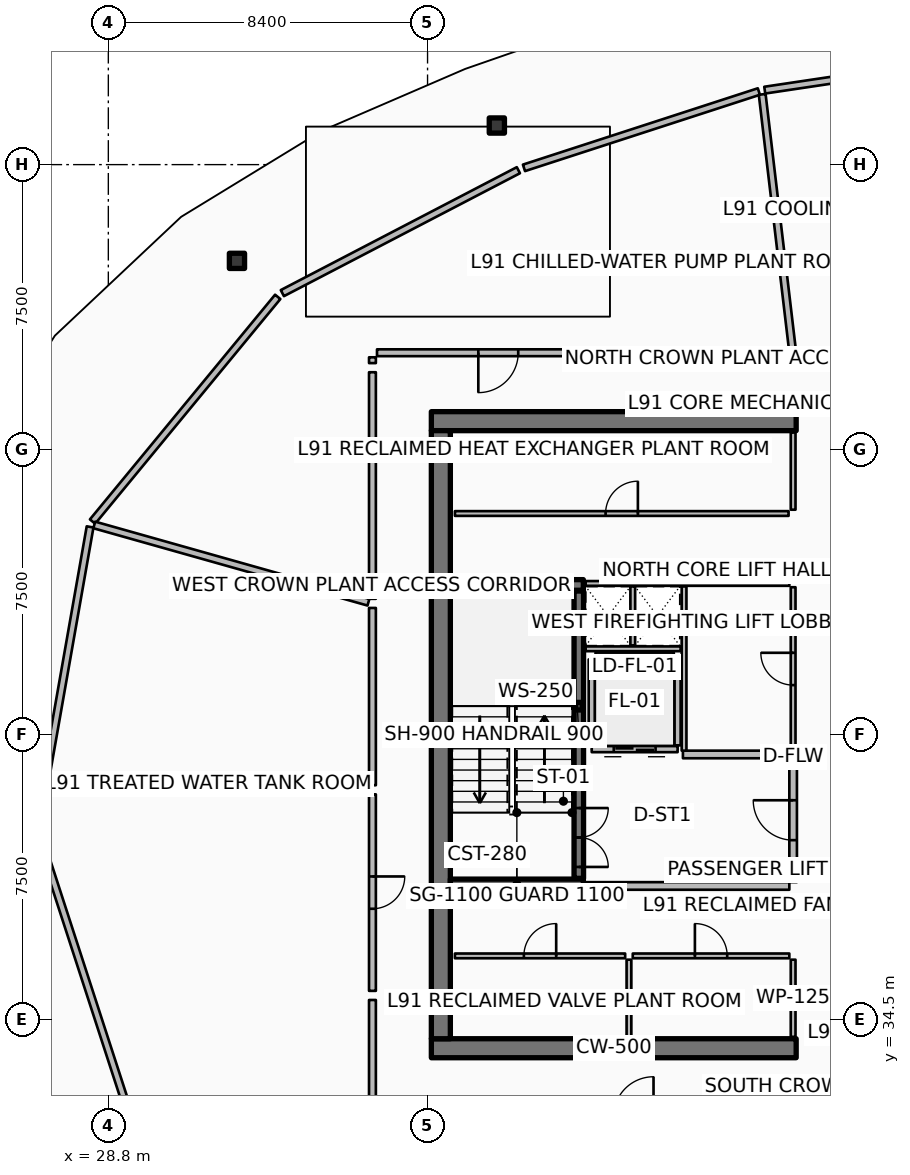
"""IFC4 building model, lengths in metres.
Left out: names, types, materials, properties, quantities, classifications, styles, units other than length and angle.
Written with IfcOpenShell. Run it as: python <this file> out.ifc"""

import sys

from ifc_helpers import new_model, si_unit, direction, frame, frame_2d, origin, origin_2d, place, context, subcontext, project, spatial, rectangle, hollow_rectangle, extrude, element, fill, save


model = new_model("IFC4")
c1 = context("Model", 3, precision=1e-05, world=origin(), true_north=direction((0.0, 1.0)))
c2 = subcontext(c1, "Body", "Model", "MODEL_VIEW")
j1 = project(units=[si_unit("LENGTHUNIT", "METRE"), si_unit("PLANEANGLEUNIT", "RADIAN")], contexts=[c1])
p1 = place(None, origin())
s1 = spatial("IfcSite", under=j1, at=p1, CompositionType="ELEMENT")
p2 = place(p1, origin())
s2 = spatial("IfcBuilding", under=s1, at=p2, CompositionType="ELEMENT")
p3 = place(p2, frame((0.0, 0.0, 363.2)))
s3 = spatial("IfcBuildingStorey", under=s2, at=p3, CompositionType="ELEMENT", Elevation=363.2)
for number, where, z_axis, x_axis in (
    (1, (37.3, 33.75, 0.0), (0.0, 0.0, 1.0), (1.0, 0.0, 0.0)),
    (2, (37.3, 50.25, 0.0), (0.0, 0.0, 1.0), (1.0, 0.0, 0.0)),
):
    element("IfcWall", number, at=place(p3, frame(where, z_axis=z_axis, x_axis=x_axis)), inside=s3, PredefinedType="SHEAR", context=c2, shape_type="SweptSolid", body=[
        extrude(rectangle(XDim=9.6, YDim=0.5, at=frame_2d((4.8, 0.0))), origin(), (0.0, 0.0, 1.0), 3.6),
    ])
p4 = place(p3, frame((37.55, 34.0, 0.0), z_axis=(0.0, 0.0, 1.0), x_axis=(0.0, 1.0, 0.0)))
e3 = element("IfcWall", 3, at=p4, inside=s3, PredefinedType="SHEAR", context=c2, shape_type="SweptSolid", body=[
    extrude(rectangle(XDim=16.0, YDim=0.5, at=frame_2d((8.0, 0.0))), origin(), (0.0, 0.0, 1.0), 3.6),
])
for number, where, z_axis, x_axis in (
    (4, (37.8, 38.06, 0.0), (0.0, 0.0, 1.0), (1.0, 0.0, 0.0)),
    (5, (37.8, 45.94, 0.0), (0.0, 0.0, 1.0), (1.0, 0.0, 0.0)),
):
    element("IfcWall", number, at=place(p3, frame(where, z_axis=z_axis, x_axis=x_axis)), inside=s3, PredefinedType="SHEAR", context=c2, shape_type="SweptSolid", body=[
        extrude(rectangle(XDim=3.5, YDim=0.28, at=frame_2d((1.75, 0.0))), origin(), (0.0, 0.0, 1.0), 3.6),
    ])
p5 = place(p3, frame((41.18, 42.75, 0.0), z_axis=(0.0, 0.0, 1.0), x_axis=(1.0, 0.0, 0.0)))
e6 = element("IfcColumn", 6, at=p5, inside=s3, PredefinedType="COLUMN", context=c2, shape_type="SweptSolid", body=[
    extrude(hollow_rectangle(XDim=0.2, YDim=0.2, WallThickness=0.01, InnerFilletRadius=0.01, OuterFilletRadius=0.02, at=origin_2d()), origin(), (0.0, 0.0, 1.0), 1.595),
])
for number, where, z_axis, x_axis in (
    (7, (39.023, 58.029, 0.0), (0.0, 0.0, 1.0), (1.0, 0.0, 0.0)),
    (8, (32.185, 54.468, 0.0), (0.0, 0.0, 1.0), (1.0, 0.0, 0.0)),
):
    element("IfcColumn", number, at=place(p3, frame(where, z_axis=z_axis, x_axis=x_axis)), inside=s3, PredefinedType="COLUMN", context=c2, shape_type="SweptSolid", body=[
        extrude(hollow_rectangle(XDim=0.4, YDim=0.4, WallThickness=0.02, InnerFilletRadius=0.02, OuterFilletRadius=0.04, at=origin_2d()), origin(), (0.0, 0.0, 1.0), 3.32),
    ])
p6 = place(p3, frame((41.18, 38.22, 0.0), z_axis=(0.0, 0.0, 1.0), x_axis=(0.0, 1.0, 0.0)))
e9 = element("IfcWall", 9, at=p6, inside=s3, PredefinedType="SOLIDWALL", context=c2, shape_type="SweptSolid", body=[
    extrude(rectangle(XDim=7.56, YDim=0.25, at=frame_2d((3.78, 0.0))), origin(), (0.0, 0.0, 1.0), 3.32),
])
p7 = place(p6, frame((0.3, 0.0, 0.0)))
e10 = element("IfcOpeningElement", 10, at=p7, cuts=e9, PredefinedType="OPENING", context=c2, shape_type="SweptSolid", body=[
    extrude(rectangle(XDim=1.55, YDim=2.15, at=frame_2d((0.775, 1.075))), frame((0.0, 0.135, 0.0), z_axis=(0.0, -1.0, 0.0), x_axis=(1.0, 0.0, 0.0)), (0.0, 0.0, 1.0), 0.27),
])
p8 = place(p3, frame((43.78, 41.62, 0.0), z_axis=(0.0, 0.0, 1.0), x_axis=(-1.0, 0.0, 0.0)))
e11 = element("IfcWall", 11, at=p8, inside=s3, PredefinedType="PARTITIONING", context=c2, shape_type="SweptSolid", body=[
    extrude(rectangle(XDim=2.26, YDim=0.16, at=frame_2d((1.13, 0.0))), origin(), (0.0, 0.0, 1.0), 3.32),
])
p9 = place(p8, frame((0.58, 0.0, 0.0)))
e12 = element("IfcOpeningElement", 12, at=p9, cuts=e11, PredefinedType="OPENING", context=c2, shape_type="SweptSolid", body=[
    extrude(rectangle(XDim=1.1, YDim=2.1, at=frame_2d((0.55, 1.05))), frame((0.0, 0.09, 0.0), z_axis=(0.0, -1.0, 0.0), x_axis=(1.0, 0.0, 0.0)), (0.0, 0.0, 1.0), 0.18),
])
for number, where, z_axis, x_axis in (
    (13, (43.78, 41.72, 0.0), (0.0, 0.0, 1.0), (0.0, 1.0, 0.0)),
    (14, (41.52, 41.72, 0.0), (0.0, 0.0, 1.0), (0.0, 1.0, 0.0)),
):
    element("IfcWall", number, at=place(p3, frame(where, z_axis=z_axis, x_axis=x_axis)), inside=s3, PredefinedType="PARTITIONING", context=c2, shape_type="SweptSolid", body=[
        extrude(rectangle(XDim=2.26, YDim=0.16, at=frame_2d((1.13, 0.0))), origin(), (0.0, 0.0, 1.0), 3.32),
    ])
p10 = place(p3, frame((41.62, 44.08, 0.0), z_axis=(0.0, 0.0, 1.0), x_axis=(1.0, 0.0, 0.0)))
e15 = element("IfcWall", 15, at=p10, inside=s3, PredefinedType="PARTITIONING", context=c2, shape_type="SweptSolid", body=[
    extrude(rectangle(XDim=2.06, YDim=0.16, at=frame_2d((1.03, 0.0))), origin(), (0.0, 0.0, 1.0), 3.32),
])
for number, where, z_axis, x_axis in (
    (16, (46.82, 34.05, 0.0), (0.0, 0.0, 1.0), (0.0, 1.0, 0.0)),
    (17, (42.5, 34.05, 0.0), (0.0, 0.0, 1.0), (0.0, 1.0, 0.0)),
):
    element("IfcWall", number, at=place(p3, frame(where, z_axis=z_axis, x_axis=x_axis)), inside=s3, PredefinedType="PARTITIONING", context=c2, shape_type="SweptSolid", body=[
        extrude(rectangle(XDim=2.03, YDim=0.125, at=frame_2d((1.015, 0.0))), origin(), (0.0, 0.0, 1.0), 2.76),
    ])
p11 = place(p3, frame((37.92, 36.18, 0.0), z_axis=(0.0, 0.0, 1.0), x_axis=(1.0, 0.0, 0.0)))
e18 = element("IfcWall", 18, at=p11, inside=s3, PredefinedType="PARTITIONING", context=c2, shape_type="SweptSolid", body=[
    extrude(rectangle(XDim=4.48, YDim=0.125, at=frame_2d((2.24, 0.0))), origin(), (0.0, 0.0, 1.0), 2.76),
])
p12 = place(p11, frame((1.815, 0.0, 0.0)))
e19 = element("IfcOpeningElement", 19, at=p12, cuts=e18, PredefinedType="OPENING", context=c2, shape_type="SweptSolid", body=[
    extrude(rectangle(XDim=0.85, YDim=2.06, at=frame_2d((0.425, 1.03))), frame((0.0, 0.073, 0.0), z_axis=(0.0, -1.0, 0.0), x_axis=(1.0, 0.0, 0.0)), (0.0, 0.0, 1.0), 0.145),
])
p13 = place(p3, frame((42.6, 36.18, 0.0), z_axis=(0.0, 0.0, 1.0), x_axis=(1.0, 0.0, 0.0)))
e20 = element("IfcWall", 20, at=p13, inside=s3, PredefinedType="PARTITIONING", context=c2, shape_type="SweptSolid", body=[
    extrude(rectangle(XDim=4.12, YDim=0.125, at=frame_2d((2.06, 0.0))), origin(), (0.0, 0.0, 1.0), 2.76),
])
p14 = place(p13, frame((1.635, 0.0, 0.0)))
e21 = element("IfcOpeningElement", 21, at=p14, cuts=e20, PredefinedType="OPENING", context=c2, shape_type="SweptSolid", body=[
    extrude(rectangle(XDim=0.85, YDim=2.06, at=frame_2d((0.425, 1.03))), frame((0.0, 0.073, 0.0), z_axis=(0.0, -1.0, 0.0), x_axis=(1.0, 0.0, 0.0)), (0.0, 0.0, 1.0), 0.145),
])
p15 = place(p3, frame((46.82, 47.92, 0.0), z_axis=(0.0, 0.0, 1.0), x_axis=(0.0, 1.0, 0.0)))
e22 = element("IfcWall", 22, at=p15, inside=s3, PredefinedType="PARTITIONING", context=c2, shape_type="SweptSolid", body=[
    extrude(rectangle(XDim=2.03, YDim=0.125, at=frame_2d((1.015, 0.0))), origin(), (0.0, 0.0, 1.0), 2.76),
])
p16 = place(p3, frame((37.92, 47.82, 0.0), z_axis=(0.0, 0.0, 1.0), x_axis=(1.0, 0.0, 0.0)))
e23 = element("IfcWall", 23, at=p16, inside=s3, PredefinedType="PARTITIONING", context=c2, shape_type="SweptSolid", body=[
    extrude(rectangle(XDim=8.78, YDim=0.125, at=frame_2d((4.39, 0.0))), origin(), (0.0, 0.0, 1.0), 2.76),
])
p17 = place(p16, frame((3.965, 0.0, 0.0)))
e24 = element("IfcOpeningElement", 24, at=p17, cuts=e23, PredefinedType="OPENING", context=c2, shape_type="SweptSolid", body=[
    extrude(rectangle(XDim=0.85, YDim=2.06, at=frame_2d((0.425, 1.03))), frame((0.0, 0.073, 0.0), z_axis=(0.0, -1.0, 0.0), x_axis=(1.0, 0.0, 0.0)), (0.0, 0.0, 1.0), 0.145),
])
p18 = place(p3, frame((41.35, 38.02, 0.0), z_axis=(0.0, 0.0, 1.0), x_axis=(1.0, 0.0, 0.0)))
e25 = element("IfcWall", 25, at=p18, inside=s3, PredefinedType="PARTITIONING", context=c2, shape_type="SweptSolid", body=[
    extrude(rectangle(XDim=5.37, YDim=0.2, at=frame_2d((2.685, 0.0))), origin(), (0.0, 0.0, 1.0), 3.32),
])
p19 = place(p3, frame((43.92, 41.48, 0.0), z_axis=(0.0, 0.0, 1.0), x_axis=(1.0, 0.0, 0.0)))
e26 = element("IfcWall", 26, at=p19, inside=s3, PredefinedType="PARTITIONING", context=c2, shape_type="SweptSolid", body=[
    extrude(rectangle(XDim=2.8, YDim=0.2, at=frame_2d((1.4, 0.0))), origin(), (0.0, 0.0, 1.0), 3.32),
])
p20 = place(p3, frame((46.82, 38.12, 0.0), z_axis=(0.0, 0.0, 1.0), x_axis=(0.0, 1.0, 0.0)))
e27 = element("IfcWall", 27, at=p20, inside=s3, PredefinedType="PARTITIONING", context=c2, shape_type="SweptSolid", body=[
    extrude(rectangle(XDim=3.26, YDim=0.2, at=frame_2d((1.63, 0.0))), origin(), (0.0, 0.0, 1.0), 3.32),
])
p21 = place(p20, frame((1.105, 0.0, 0.0)))
e28 = element("IfcOpeningElement", 28, at=p21, cuts=e27, PredefinedType="OPENING", context=c2, shape_type="SweptSolid", body=[
    extrude(rectangle(XDim=1.05, YDim=2.1, at=frame_2d((0.525, 1.05))), frame((0.0, 0.11, 0.0), z_axis=(0.0, -1.0, 0.0), x_axis=(1.0, 0.0, 0.0)), (0.0, 0.0, 1.0), 0.22),
])
p22 = place(p3, frame((41.36, 45.98, 0.0), z_axis=(0.0, 0.0, 1.0), x_axis=(1.0, 0.0, 0.0)))
e29 = element("IfcWall", 29, at=p22, inside=s3, PredefinedType="PARTITIONING", context=c2, shape_type="SweptSolid", body=[
    extrude(rectangle(XDim=5.36, YDim=0.125, at=frame_2d((2.68, 0.0))), origin(), (0.0, 0.0, 1.0), 2.76),
])
p23 = place(p3, frame((41.36, 44.26, 0.0), z_axis=(0.0, 0.0, 1.0), x_axis=(1.0, 0.0, 0.0)))
e30 = element("IfcWall", 30, at=p23, inside=s3, PredefinedType="PARTITIONING", context=c2, shape_type="SweptSolid", body=[
    extrude(rectangle(XDim=2.5, YDim=0.125, at=frame_2d((1.25, 0.0))), origin(), (0.0, 0.0, 1.0), 2.76),
])
p24 = place(p3, frame((42.6, 44.35, 0.0), z_axis=(0.0, 0.0, 1.0), x_axis=(0.0, 1.0, 0.0)))
e31 = element("IfcWall", 31, at=p24, inside=s3, PredefinedType="PARTITIONING", context=c2, shape_type="SweptSolid", body=[
    extrude(rectangle(XDim=1.55, YDim=0.125, at=frame_2d((0.775, 0.0))), origin(), (0.0, 0.0, 1.0), 2.76),
])
p25 = place(p3, frame((43.95, 41.58, 0.0), z_axis=(0.0, 0.0, 1.0), x_axis=(0.0, 1.0, 0.0)))
e32 = element("IfcWall", 32, at=p25, inside=s3, PredefinedType="PARTITIONING", context=c2, shape_type="SweptSolid", body=[
    extrude(rectangle(XDim=4.32, YDim=0.125, at=frame_2d((2.16, 0.0))), origin(), (0.0, 0.0, 1.0), 2.76),
])
p26 = place(p3, frame((46.82, 41.58, 0.0), z_axis=(0.0, 0.0, 1.0), x_axis=(0.0, 1.0, 0.0)))
e33 = element("IfcWall", 33, at=p26, inside=s3, PredefinedType="PARTITIONING", context=c2, shape_type="SweptSolid", body=[
    extrude(rectangle(XDim=4.3, YDim=0.125, at=frame_2d((2.15, 0.0))), origin(), (0.0, 0.0, 1.0), 2.76),
])
p27 = place(p26, frame((1.725, 0.0, 0.0)))
e34 = element("IfcOpeningElement", 34, at=p27, cuts=e33, PredefinedType="OPENING", context=c2, shape_type="SweptSolid", body=[
    extrude(rectangle(XDim=0.85, YDim=2.06, at=frame_2d((0.425, 1.03))), frame((0.0, 0.073, 0.0), z_axis=(0.0, -1.0, 0.0), x_axis=(1.0, 0.0, 0.0)), (0.0, 0.0, 1.0), 0.145),
])
p28 = place(p3, frame((52.999, 59.994, 0.0), z_axis=(0.0, 0.0, 1.0), x_axis=(-0.989034336252, -0.147685753256, 0.0)))
e35 = element("IfcWall", 35, at=p28, inside=s3, PredefinedType="PARTITIONING", context=c2, shape_type="SweptSolid", body=[
    extrude(rectangle(XDim=7.003, YDim=0.18, at=frame_2d((3.501, 0.0))), origin(), (0.0, 0.0, 1.0), 2.76),
])
p29 = place(p3, frame((45.918, 58.923, 0.0), z_axis=(0.0, 0.0, 1.0), x_axis=(-0.95105283999, -0.309028308649, 0.0)))
e36 = element("IfcWall", 36, at=p29, inside=s3, PredefinedType="PARTITIONING", context=c2, shape_type="SweptSolid", body=[
    extrude(rectangle(XDim=6.499, YDim=0.18, at=frame_2d((3.25, 0.0))), origin(), (0.0, 0.0, 1.0), 2.76),
])
p30 = place(p3, frame((39.59, 56.853, 0.0), z_axis=(0.0, 0.0, 1.0), x_axis=(-0.886949494865, -0.461866423935, 0.0)))
e37 = element("IfcWall", 37, at=p30, inside=s3, PredefinedType="PARTITIONING", context=c2, shape_type="SweptSolid", body=[
    extrude(rectangle(XDim=7.002, YDim=0.18, at=frame_2d((3.501, 0.0))), origin(), (0.0, 0.0, 1.0), 2.76),
])
p31 = place(p3, frame((33.258, 53.52, 0.0), z_axis=(0.0, 0.0, 1.0), x_axis=(-0.636018833443, -0.771673534278, 0.0)))
e38 = element("IfcWall", 38, at=p31, inside=s3, PredefinedType="PARTITIONING", context=c2, shape_type="SweptSolid", body=[
    extrude(rectangle(XDim=7.661, YDim=0.18, at=frame_2d((3.831, 0.0))), origin(), (0.0, 0.0, 1.0), 2.76),
])
p32 = place(p3, frame((28.32, 47.468, 0.0), z_axis=(0.0, 0.0, 1.0), x_axis=(-0.173668776466, -0.984804120666, 0.0)))
e39 = element("IfcWall", 39, at=p32, inside=s3, PredefinedType="PARTITIONING", context=c2, shape_type="SweptSolid", body=[
    extrude(rectangle(XDim=8.006, YDim=0.18, at=frame_2d((4.003, 0.0))), origin(), (0.0, 0.0, 1.0), 2.76),
])
p33 = place(p3, frame((26.941, 39.428, 0.0), z_axis=(0.0, 0.0, 1.0), x_axis=(0.309024234991, -0.951054163646, 0.0)))
e40 = element("IfcWall", 40, at=p33, inside=s3, PredefinedType="PARTITIONING", context=c2, shape_type="SweptSolid", body=[
    extrude(rectangle(XDim=8.124, YDim=0.18, at=frame_2d((4.062, 0.0))), origin(), (0.0, 0.0, 1.0), 2.76),
])
p34 = place(p3, frame((50.714, 52.05, 0.0), z_axis=(0.0, 0.0, 1.0), x_axis=(-1.0, 0.0, 0.0)))
e41 = element("IfcWall", 41, at=p34, inside=s3, PredefinedType="PARTITIONING", context=c2, shape_type="SweptSolid", body=[
    extrude(rectangle(XDim=3.784, YDim=0.18, at=frame_2d((1.892, 0.0))), origin(), (0.0, 0.0, 1.0), 2.76),
])
p35 = place(p3, frame((46.798, 52.159, 0.0), z_axis=(0.0, 0.0, 1.0), x_axis=(-0.117541495417, 0.993067971921, 0.0)))
e42 = element("IfcWall", 42, at=p35, inside=s3, PredefinedType="PARTITIONING", context=c2, shape_type="SweptSolid", body=[
    extrude(rectangle(XDim=6.736, YDim=0.18, at=frame_2d((3.368, 0.0))), origin(), (0.0, 0.0, 1.0), 2.76),
])
p36 = place(p3, frame((46.69, 52.05, 0.0), z_axis=(0.0, 0.0, 1.0), x_axis=(-1.0, 0.0, 0.0)))
e43 = element("IfcWall", 43, at=p36, inside=s3, PredefinedType="PARTITIONING", context=c2, shape_type="SweptSolid", body=[
    extrude(rectangle(XDim=4.199, YDim=0.18, at=frame_2d((2.099, 0.0))), origin(), (0.0, 0.0, 1.0), 2.76),
])
p37 = place(p3, frame((42.252, 52.05, 0.0), z_axis=(0.0, 0.0, 1.0), x_axis=(-1.0, 0.0, 0.0)))
e44 = element("IfcWall", 44, at=p37, inside=s3, PredefinedType="PARTITIONING", context=c2, shape_type="SweptSolid", body=[
    extrude(rectangle(XDim=6.382, YDim=0.18, at=frame_2d((3.191, 0.0))), origin(), (0.0, 0.0, 1.0), 2.76),
])
p38 = place(p37, frame((2.666, 0.0, 0.0)))
e45 = element("IfcOpeningElement", 45, at=p38, cuts=e44, PredefinedType="OPENING", context=c2, shape_type="SweptSolid", body=[
    extrude(rectangle(XDim=1.05, YDim=2.1, at=frame_2d((0.525, 1.05))), frame((0.0, 0.1, 0.0), z_axis=(0.0, -1.0, 0.0), x_axis=(1.0, 0.0, 0.0)), (0.0, 0.0, 1.0), 0.2),
])
p39 = place(p3, frame((35.75, 51.93, 0.0), z_axis=(0.0, 0.0, 1.0), x_axis=(0.0, -1.0, 0.0)))
e46 = element("IfcWall", 46, at=p39, inside=s3, PredefinedType="PARTITIONING", context=c2, shape_type="SweptSolid", body=[
    extrude(rectangle(XDim=0.153, YDim=0.18, at=frame_2d((0.076, 0.0))), origin(), (0.0, 0.0, 1.0), 2.76),
])
p40 = place(p3, frame((35.75, 51.537, 0.0), z_axis=(0.0, 0.0, 1.0), x_axis=(0.0, -1.0, 0.0)))
e47 = element("IfcWall", 47, at=p40, inside=s3, PredefinedType="PARTITIONING", context=c2, shape_type="SweptSolid", body=[
    extrude(rectangle(XDim=5.962, YDim=0.18, at=frame_2d((2.981, 0.0))), origin(), (0.0, 0.0, 1.0), 2.76),
])
p41 = place(p3, frame((35.644, 45.485, 0.0), z_axis=(0.0, 0.0, 1.0), x_axis=(-0.96245862205, 0.271428445159, 0.0)))
e48 = element("IfcWall", 48, at=p41, inside=s3, PredefinedType="PARTITIONING", context=c2, shape_type="SweptSolid", body=[
    extrude(rectangle(XDim=7.495, YDim=0.18, at=frame_2d((3.748, 0.0))), origin(), (0.0, 0.0, 1.0), 2.76),
])
p42 = place(p3, frame((35.75, 45.335, 0.0), z_axis=(0.0, 0.0, 1.0), x_axis=(0.0, -1.0, 0.0)))
e49 = element("IfcWall", 49, at=p42, inside=s3, PredefinedType="PARTITIONING", context=c2, shape_type="SweptSolid", body=[
    extrude(rectangle(XDim=4.665, YDim=0.18, at=frame_2d((2.333, 0.0))), origin(), (0.0, 0.0, 1.0), 2.76),
])
p43 = place(p3, frame((35.75, 40.43, 0.0), z_axis=(0.0, 0.0, 1.0), x_axis=(0.0, -1.0, 0.0)))
e50 = element("IfcWall", 50, at=p43, inside=s3, PredefinedType="PARTITIONING", context=c2, shape_type="SweptSolid", body=[
    extrude(rectangle(XDim=5.17, YDim=0.18, at=frame_2d((2.585, 0.0))), origin(), (0.0, 0.0, 1.0), 2.76),
])
p44 = place(p43, frame((2.16, 0.0, 0.0)))
e51 = element("IfcOpeningElement", 51, at=p44, cuts=e50, PredefinedType="OPENING", context=c2, shape_type="SweptSolid", body=[
    extrude(rectangle(XDim=0.85, YDim=2.06, at=frame_2d((0.425, 1.03))), frame((0.0, 0.1, 0.0), z_axis=(0.0, -1.0, 0.0), x_axis=(1.0, 0.0, 0.0)), (0.0, 0.0, 1.0), 0.2),
])
p45 = place(p3, frame((35.75, 35.02, 0.0), z_axis=(0.0, 0.0, 1.0), x_axis=(0.0, -1.0, 0.0)))
e52 = element("IfcWall", 52, at=p45, inside=s3, PredefinedType="PARTITIONING", context=c2, shape_type="SweptSolid", body=[
    extrude(rectangle(XDim=2.95, YDim=0.18, at=frame_2d((1.475, 0.0))), origin(), (0.0, 0.0, 1.0), 2.76),
])
p46 = place(p7, origin())
e53 = element("IfcDoor", 53, at=p46, inside=s3, OperationType="DOUBLE_DOOR_SINGLE_SWING", PredefinedType="DOOR", context=c2, shape_type="SweptSolid", body=[
    extrude(rectangle(XDim=1.55, YDim=2.15, at=frame_2d((0.775, 1.075))), frame((0.0, 0.025, 0.0), z_axis=(0.0, -1.0, 0.0), x_axis=(1.0, 0.0, 0.0)), (0.0, 0.0, 1.0), 0.05),
])
fill(e10, e53)
p47 = place(p9, origin())
e54 = element("IfcDoor", 54, at=p47, inside=s3, OperationType="DOUBLE_DOOR_SLIDING", PredefinedType="DOOR", context=c2, shape_type="SweptSolid", body=[
    extrude(rectangle(XDim=1.1, YDim=2.1, at=frame_2d((0.55, 1.05))), frame((0.0, 0.025, 0.0), z_axis=(0.0, -1.0, 0.0), x_axis=(1.0, 0.0, 0.0)), (0.0, 0.0, 1.0), 0.05),
])
fill(e12, e54)
p48 = place(p12, origin())
e55 = element("IfcDoor", 55, at=p48, inside=s3, OperationType="SINGLE_SWING_RIGHT", PredefinedType="DOOR", context=c2, shape_type="SweptSolid", body=[
    extrude(rectangle(XDim=0.85, YDim=2.06, at=frame_2d((0.425, 1.03))), frame((0.0, 0.025, 0.0), z_axis=(0.0, -1.0, 0.0), x_axis=(1.0, 0.0, 0.0)), (0.0, 0.0, 1.0), 0.05),
])
fill(e19, e55)
p49 = place(p14, origin())
e56 = element("IfcDoor", 56, at=p49, inside=s3, OperationType="SINGLE_SWING_LEFT", PredefinedType="DOOR", context=c2, shape_type="SweptSolid", body=[
    extrude(rectangle(XDim=0.85, YDim=2.06, at=frame_2d((0.425, 1.03))), frame((0.0, 0.025, 0.0), z_axis=(0.0, -1.0, 0.0), x_axis=(1.0, 0.0, 0.0)), (0.0, 0.0, 1.0), 0.05),
])
fill(e21, e56)
p50 = place(p17, origin())
e57 = element("IfcDoor", 57, at=p50, inside=s3, OperationType="SINGLE_SWING_RIGHT", PredefinedType="DOOR", context=c2, shape_type="SweptSolid", body=[
    extrude(rectangle(XDim=0.85, YDim=2.06, at=frame_2d((0.425, 1.03))), frame((0.0, 0.025, 0.0), z_axis=(0.0, -1.0, 0.0), x_axis=(1.0, 0.0, 0.0)), (0.0, 0.0, 1.0), 0.05),
])
fill(e24, e57)
p51 = place(p21, origin())
e58 = element("IfcDoor", 58, at=p51, inside=s3, OperationType="SINGLE_SWING_RIGHT", PredefinedType="DOOR", context=c2, shape_type="SweptSolid", body=[
    extrude(rectangle(XDim=1.05, YDim=2.1, at=frame_2d((0.525, 1.05))), frame((0.0, 0.025, 0.0), z_axis=(0.0, -1.0, 0.0), x_axis=(1.0, 0.0, 0.0)), (0.0, 0.0, 1.0), 0.05),
])
fill(e28, e58)
p52 = place(p27, origin())
e59 = element("IfcDoor", 59, at=p52, inside=s3, OperationType="SINGLE_SWING_RIGHT", PredefinedType="DOOR", context=c2, shape_type="SweptSolid", body=[
    extrude(rectangle(XDim=0.85, YDim=2.06, at=frame_2d((0.425, 1.03))), frame((0.0, 0.025, 0.0), z_axis=(0.0, -1.0, 0.0), x_axis=(1.0, 0.0, 0.0)), (0.0, 0.0, 1.0), 0.05),
])
fill(e34, e59)
p53 = place(p38, origin())
e60 = element("IfcDoor", 60, at=p53, inside=s3, OperationType="SINGLE_SWING_RIGHT", PredefinedType="DOOR", context=c2, shape_type="SweptSolid", body=[
    extrude(rectangle(XDim=1.05, YDim=2.1, at=frame_2d((0.525, 1.05))), frame((0.0, 0.025, 0.0), z_axis=(0.0, -1.0, 0.0), x_axis=(1.0, 0.0, 0.0)), (0.0, 0.0, 1.0), 0.05),
])
fill(e45, e60)
p54 = place(p44, origin())
e61 = element("IfcDoor", 61, at=p54, inside=s3, OperationType="SINGLE_SWING_LEFT", PredefinedType="DOOR", context=c2, shape_type="SweptSolid", body=[
    extrude(rectangle(XDim=0.85, YDim=2.06, at=frame_2d((0.425, 1.03))), frame((0.0, 0.025, 0.0), z_axis=(0.0, -1.0, 0.0), x_axis=(1.0, 0.0, 0.0)), (0.0, 0.0, 1.0), 0.05),
])
fill(e51, e61)
save(model, sys.argv[1])
